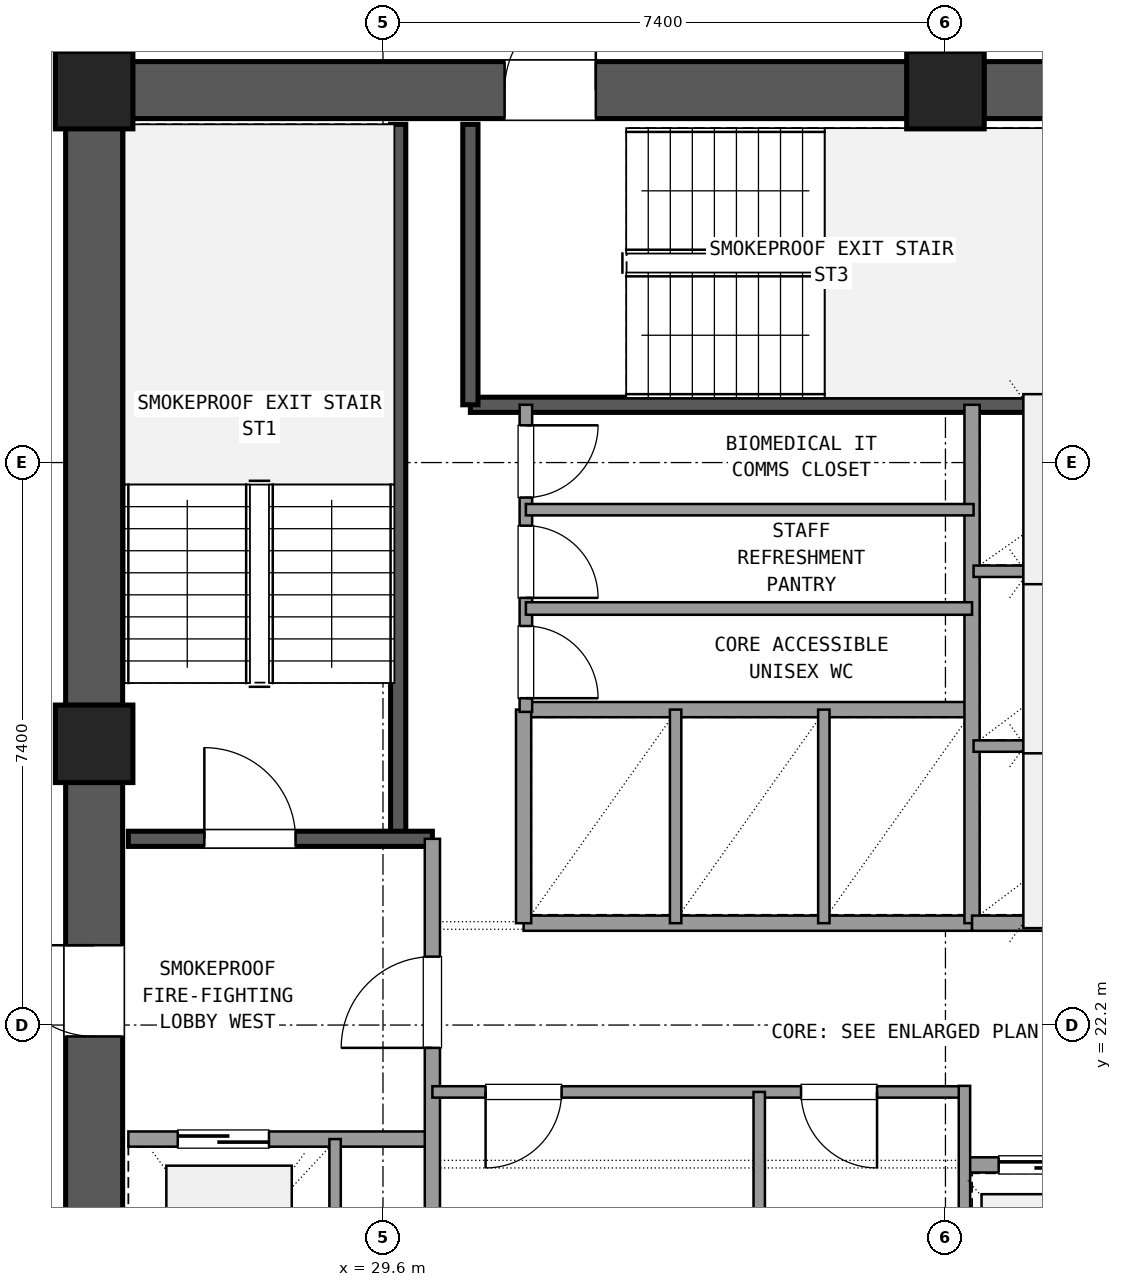
"""IFC4 building model, lengths in metres.
Left out: names, types, materials, properties, quantities, classifications, styles, units other than length and angle.
Written with IfcOpenShell. Run it as: python <this file> out.ifc"""

import sys

from ifc_helpers import new_model, si_unit, direction, frame, frame_2d, origin, origin_2d, place, context, subcontext, project, spatial, rectangle, extrude, element, fill, save


model = new_model("IFC4")
c1 = context("Model", 3, precision=1e-05, world=origin(), true_north=direction((0.0, 1.0)))
c2 = subcontext(c1, "Body", "Model", "MODEL_VIEW")
j1 = project(units=[si_unit("LENGTHUNIT", "METRE"), si_unit("PLANEANGLEUNIT", "RADIAN")], contexts=[c1])
p1 = place(None, origin())
s1 = spatial("IfcSite", under=j1, at=p1, CompositionType="ELEMENT")
p2 = place(p1, origin())
s2 = spatial("IfcBuilding", under=s1, at=p2, CompositionType="ELEMENT")
p3 = place(p2, frame((0.0, 0.0, 145.62)))
s3 = spatial("IfcBuildingStorey", under=s2, at=p3, CompositionType="ELEMENT", Elevation=145.62)
for number, where, z_axis, x_axis in (
    (1, (37.0, 34.5, 0.0), (0.0, 0.0, 1.0), (1.0, 0.0, 0.0)),
    (2, (25.8, 34.5, 0.0), (0.0, 0.0, 1.0), (1.0, 0.0, 0.0)),
    (3, (25.8, 25.9, 0.0), (0.0, 0.0, 1.0), (1.0, 0.0, 0.0)),
):
    element("IfcColumn", number, at=place(p3, frame(where, z_axis=z_axis, x_axis=x_axis)), inside=s3, PredefinedType="COLUMN", context=c2, shape_type="SweptSolid", body=[
        extrude(rectangle(XDim=1.02, YDim=1.02, at=origin_2d()), origin(), (0.0, 0.0, 1.0), 3.6),
    ])
p4 = place(p3, frame((47.695, 34.5, 0.0), z_axis=(0.0, 0.0, 1.0), x_axis=(-1.0, 0.0, 0.0)))
e4 = element("IfcWall", 4, at=p4, inside=s3, PredefinedType="SHEAR", context=c2, shape_type="SweptSolid", body=[
    extrude(rectangle(XDim=10.19, YDim=0.75, at=frame_2d((5.095, 0.0))), origin(), (0.0, 0.0, 1.0), 3.32),
])
p5 = place(p4, frame((4.595, 0.0, 0.0)))
e5 = element("IfcOpeningElement", 5, at=p5, cuts=e4, PredefinedType="OPENING", context=c2, shape_type="SweptSolid", body=[
    extrude(rectangle(XDim=1.6, YDim=2.2, at=frame_2d((0.8, 1.1))), frame((0.0, 0.385, 0.0), z_axis=(0.0, -1.0, 0.0), x_axis=(1.0, 0.0, 0.0)), (0.0, 0.0, 1.0), 0.77),
])
p6 = place(p3, frame((36.495, 34.5, 0.0), z_axis=(0.0, 0.0, 1.0), x_axis=(-1.0, 0.0, 0.0)))
e6 = element("IfcWall", 6, at=p6, inside=s3, PredefinedType="SHEAR", context=c2, shape_type="SweptSolid", body=[
    extrude(rectangle(XDim=10.19, YDim=0.75, at=frame_2d((5.095, 0.0))), origin(), (0.0, 0.0, 1.0), 3.32),
])
p7 = place(p6, frame((4.095, 0.0, 0.0)))
e7 = element("IfcOpeningElement", 7, at=p7, cuts=e6, PredefinedType="OPENING", context=c2, shape_type="SweptSolid", body=[
    extrude(rectangle(XDim=1.2, YDim=2.15, at=frame_2d((0.6, 1.075))), frame((0.0, 0.385, 0.0), z_axis=(0.0, -1.0, 0.0), x_axis=(1.0, 0.0, 0.0)), (0.0, 0.0, 1.0), 0.77),
])
p8 = place(p3, frame((25.8, 33.995, 0.0), z_axis=(0.0, 0.0, 1.0), x_axis=(0.0, -1.0, 0.0)))
e8 = element("IfcWall", 8, at=p8, inside=s3, PredefinedType="SHEAR", context=c2, shape_type="SweptSolid", body=[
    extrude(rectangle(XDim=7.59, YDim=0.75, at=frame_2d((3.795, 0.0))), origin(), (0.0, 0.0, 1.0), 3.32),
])
p9 = place(p3, frame((25.8, 25.395, 0.0), z_axis=(0.0, 0.0, 1.0), x_axis=(0.0, -1.0, 0.0)))
e9 = element("IfcWall", 9, at=p9, inside=s3, PredefinedType="SHEAR", context=c2, shape_type="SweptSolid", body=[
    extrude(rectangle(XDim=7.59, YDim=0.75, at=frame_2d((3.795, 0.0))), origin(), (0.0, 0.0, 1.0), 3.32),
])
p10 = place(p9, frame((2.145, 0.0, 0.0)))
e10 = element("IfcOpeningElement", 10, at=p10, cuts=e9, PredefinedType="OPENING", context=c2, shape_type="SweptSolid", body=[
    extrude(rectangle(XDim=1.2, YDim=2.15, at=frame_2d((0.6, 1.075))), frame((0.0, 0.385, 0.0), z_axis=(0.0, -1.0, 0.0), x_axis=(1.0, 0.0, 0.0)), (0.0, 0.0, 1.0), 0.77),
])
p11 = place(p3, frame((29.8, 24.65, 0.0), z_axis=(0.0, 0.0, 1.0), x_axis=(0.0, 1.0, 0.0)))
e11 = element("IfcWall", 11, at=p11, inside=s3, PredefinedType="SHEAR", context=c2, shape_type="SweptSolid", body=[
    extrude(rectangle(XDim=9.4, YDim=0.2, at=frame_2d((4.7, 0.0))), origin(), (0.0, 0.0, 1.0), 3.32),
])
p12 = place(p3, frame((26.25, 24.65, 0.0), z_axis=(0.0, 0.0, 1.0), x_axis=(1.0, 0.0, 0.0)))
e12 = element("IfcWall", 12, at=p12, inside=s3, PredefinedType="SHEAR", context=c2, shape_type="SweptSolid", body=[
    extrude(rectangle(XDim=4.0, YDim=0.2, at=frame_2d((2.0, 0.0))), origin(), (0.0, 0.0, 1.0), 3.32),
])
p13 = place(p12, frame((1.0, 0.0, 0.0)))
e13 = element("IfcOpeningElement", 13, at=p13, cuts=e12, PredefinedType="OPENING", context=c2, shape_type="SweptSolid", body=[
    extrude(rectangle(XDim=1.2, YDim=2.15, at=frame_2d((0.6, 1.075))), frame((0.0, 0.11, 0.0), z_axis=(0.0, -1.0, 0.0), x_axis=(1.0, 0.0, 0.0)), (0.0, 0.0, 1.0), 0.22),
])
p14 = place(p3, frame((30.75, 30.36, 0.0), z_axis=(0.0, 0.0, 1.0), x_axis=(1.0, 0.0, 0.0)))
e14 = element("IfcWall", 14, at=p14, inside=s3, PredefinedType="SHEAR", context=c2, shape_type="SweptSolid", body=[
    extrude(rectangle(XDim=9.5, YDim=0.2, at=frame_2d((4.75, 0.0))), origin(), (0.0, 0.0, 1.0), 3.32),
])
p15 = place(p3, frame((30.75, 30.36, 0.0), z_axis=(0.0, 0.0, 1.0), x_axis=(0.0, 1.0, 0.0)))
e15 = element("IfcWall", 15, at=p15, inside=s3, PredefinedType="SHEAR", context=c2, shape_type="SweptSolid", body=[
    extrude(rectangle(XDim=3.69, YDim=0.2, at=frame_2d((1.845, 0.0))), origin(), (0.0, 0.0, 1.0), 3.32),
])
p16 = place(p3, frame((26.25, 20.7, 0.0), z_axis=(0.0, 0.0, 1.0), x_axis=(1.0, 0.0, 0.0)))
e16 = element("IfcWall", 16, at=p16, inside=s3, PredefinedType="SOLIDWALL", context=c2, shape_type="SweptSolid", body=[
    extrude(rectangle(XDim=4.0, YDim=0.2, at=frame_2d((2.0, 0.0))), origin(), (0.0, 0.0, 1.0), 2.61),
])
p17 = place(p16, frame((0.65, 0.0, 0.0)))
e17 = element("IfcOpeningElement", 17, at=p17, cuts=e16, PredefinedType="OPENING", context=c2, shape_type="SweptSolid", body=[
    extrude(rectangle(XDim=1.2, YDim=2.15, at=frame_2d((0.6, 1.075))), frame((0.0, 0.11, 0.0), z_axis=(0.0, -1.0, 0.0), x_axis=(1.0, 0.0, 0.0)), (0.0, 0.0, 1.0), 0.22),
])
p18 = place(p3, frame((30.25, 17.75, 0.0), z_axis=(0.0, 0.0, 1.0), x_axis=(0.0, 1.0, 0.0)))
e18 = element("IfcWall", 18, at=p18, inside=s3, PredefinedType="SOLIDWALL", context=c2, shape_type="SweptSolid", body=[
    extrude(rectangle(XDim=6.9, YDim=0.2, at=frame_2d((3.45, 0.0))), origin(), (0.0, 0.0, 1.0), 2.61),
])
p19 = place(p18, frame((4.15, 0.0, 0.0)))
e19 = element("IfcOpeningElement", 19, at=p19, cuts=e18, PredefinedType="OPENING", context=c2, shape_type="SweptSolid", body=[
    extrude(rectangle(XDim=1.2, YDim=2.15, at=frame_2d((0.6, 1.075))), frame((0.0, 0.11, 0.0), z_axis=(0.0, -1.0, 0.0), x_axis=(1.0, 0.0, 0.0)), (0.0, 0.0, 1.0), 0.22),
])
p20 = place(p3, frame((28.97, 17.75, 0.0), z_axis=(0.0, 0.0, 1.0), x_axis=(0.0, 1.0, 0.0)))
e20 = element("IfcWall", 20, at=p20, inside=s3, PredefinedType="PARTITIONING", context=c2, shape_type="SweptSolid", body=[
    extrude(rectangle(XDim=2.95, YDim=0.15, at=frame_2d((1.475, 0.0))), origin(), (0.0, 0.0, 1.0), 2.61),
])
p21 = place(p3, frame((30.25, 21.32, 0.0), z_axis=(0.0, 0.0, 1.0), x_axis=(1.0, 0.0, 0.0)))
e21 = element("IfcWall", 21, at=p21, inside=s3, PredefinedType="PARTITIONING", context=c2, shape_type="SweptSolid", body=[
    extrude(rectangle(XDim=7.0, YDim=0.15, at=frame_2d((3.5, 0.0))), origin(), (0.0, 0.0, 1.0), 2.61),
])
p22 = place(p21, frame((0.7, 0.0, 0.0)))
e22 = element("IfcOpeningElement", 22, at=p22, cuts=e21, PredefinedType="OPENING", context=c2, shape_type="SweptSolid", body=[
    extrude(rectangle(XDim=1.0, YDim=2.15, at=frame_2d((0.5, 1.075))), frame((0.0, 0.085, 0.0), z_axis=(0.0, -1.0, 0.0), x_axis=(1.0, 0.0, 0.0)), (0.0, 0.0, 1.0), 0.17),
])
p23 = place(p21, frame((4.85, 0.0, 0.0)))
e23 = element("IfcOpeningElement", 23, at=p23, cuts=e21, PredefinedType="OPENING", context=c2, shape_type="SweptSolid", body=[
    extrude(rectangle(XDim=1.0, YDim=2.15, at=frame_2d((0.5, 1.075))), frame((0.0, 0.085, 0.0), z_axis=(0.0, -1.0, 0.0), x_axis=(1.0, 0.0, 0.0)), (0.0, 0.0, 1.0), 0.17),
])
p24 = place(p3, frame((34.55, 17.75, 0.0), z_axis=(0.0, 0.0, 1.0), x_axis=(0.0, 1.0, 0.0)))
e24 = element("IfcWall", 24, at=p24, inside=s3, PredefinedType="PARTITIONING", context=c2, shape_type="SweptSolid", body=[
    extrude(rectangle(XDim=3.57, YDim=0.15, at=frame_2d((1.785, 0.0))), origin(), (0.0, 0.0, 1.0), 2.61),
])
p25 = place(p3, frame((37.25, 20.36, 0.0), z_axis=(0.0, 0.0, 1.0), x_axis=(1.0, 0.0, 0.0)))
e25 = element("IfcWall", 25, at=p25, inside=s3, PredefinedType="SOLIDWALL", context=c2, shape_type="SweptSolid", body=[
    extrude(rectangle(XDim=6.1, YDim=0.2, at=frame_2d((3.05, 0.0))), origin(), (0.0, 0.0, 1.0), 2.61),
])
p26 = place(p25, frame((0.45, 0.0, 0.0)))
e26 = element("IfcOpeningElement", 26, at=p26, cuts=e25, PredefinedType="OPENING", context=c2, shape_type="SweptSolid", body=[
    extrude(rectangle(XDim=1.1, YDim=2.15, at=frame_2d((0.55, 1.075))), frame((0.0, 0.11, 0.0), z_axis=(0.0, -1.0, 0.0), x_axis=(1.0, 0.0, 0.0)), (0.0, 0.0, 1.0), 0.22),
])
p27 = place(p25, frame((2.5, 0.0, 0.0)))
e27 = element("IfcOpeningElement", 27, at=p27, cuts=e25, PredefinedType="OPENING", context=c2, shape_type="SweptSolid", body=[
    extrude(rectangle(XDim=1.1, YDim=2.15, at=frame_2d((0.55, 1.075))), frame((0.0, 0.11, 0.0), z_axis=(0.0, -1.0, 0.0), x_axis=(1.0, 0.0, 0.0)), (0.0, 0.0, 1.0), 0.22),
])
p28 = place(p25, frame((4.55, 0.0, 0.0)))
e28 = element("IfcOpeningElement", 28, at=p28, cuts=e25, PredefinedType="OPENING", context=c2, shape_type="SweptSolid", body=[
    extrude(rectangle(XDim=1.1, YDim=2.15, at=frame_2d((0.55, 1.075))), frame((0.0, 0.11, 0.0), z_axis=(0.0, -1.0, 0.0), x_axis=(1.0, 0.0, 0.0)), (0.0, 0.0, 1.0), 0.22),
])
p29 = place(p3, frame((37.25, 17.75, 0.0), z_axis=(0.0, 0.0, 1.0), x_axis=(0.0, 1.0, 0.0)))
e29 = element("IfcWall", 29, at=p29, inside=s3, PredefinedType="PARTITIONING", context=c2, shape_type="SweptSolid", body=[
    extrude(rectangle(XDim=3.65, YDim=0.15, at=frame_2d((1.825, 0.0))), origin(), (0.0, 0.0, 1.0), 2.61),
])
for number, where, z_axis, x_axis in (
    (30, (31.45, 23.54, 0.0), (0.0, 0.0, 1.0), (1.0, 0.0, 0.0)),
    (31, (31.45, 26.35, 0.0), (0.0, 0.0, 1.0), (1.0, 0.0, 0.0)),
):
    element("IfcWall", number, at=place(p3, frame(where, z_axis=z_axis, x_axis=x_axis)), inside=s3, PredefinedType="SOLIDWALL", context=c2, shape_type="SweptSolid", body=[
        extrude(rectangle(XDim=5.9, YDim=0.2, at=frame_2d((2.95, 0.0))), origin(), (0.0, 0.0, 1.0), 2.61),
    ])
p30 = place(p3, frame((31.45, 23.54, 0.0), z_axis=(0.0, 0.0, 1.0), x_axis=(0.0, 1.0, 0.0)))
e32 = element("IfcWall", 32, at=p30, inside=s3, PredefinedType="SOLIDWALL", context=c2, shape_type="SweptSolid", body=[
    extrude(rectangle(XDim=2.81, YDim=0.2, at=frame_2d((1.405, 0.0))), origin(), (0.0, 0.0, 1.0), 2.61),
])
for number, where, z_axis, x_axis in (
    (33, (33.45, 23.54, 0.0), (0.0, 0.0, 1.0), (0.0, 1.0, 0.0)),
    (34, (35.4, 23.54, 0.0), (0.0, 0.0, 1.0), (0.0, 1.0, 0.0)),
):
    element("IfcWall", number, at=place(p3, frame(where, z_axis=z_axis, x_axis=x_axis)), inside=s3, PredefinedType="PARTITIONING", context=c2, shape_type="SweptSolid", body=[
        extrude(rectangle(XDim=2.81, YDim=0.15, at=frame_2d((1.405, 0.0))), origin(), (0.0, 0.0, 1.0), 2.61),
    ])
p31 = place(p3, frame((37.35, 23.54, 0.0), z_axis=(0.0, 0.0, 1.0), x_axis=(0.0, 1.0, 0.0)))
e35 = element("IfcWall", 35, at=p31, inside=s3, PredefinedType="SOLIDWALL", context=c2, shape_type="SweptSolid", body=[
    extrude(rectangle(XDim=6.82, YDim=0.2, at=frame_2d((3.41, 0.0))), origin(), (0.0, 0.0, 1.0), 2.61),
])
p32 = place(p3, frame((37.35, 23.54, 0.0), z_axis=(0.0, 0.0, 1.0), x_axis=(1.0, 0.0, 0.0)))
e36 = element("IfcWall", 36, at=p32, inside=s3, PredefinedType="SOLIDWALL", context=c2, shape_type="SweptSolid", body=[
    extrude(rectangle(XDim=3.05, YDim=0.2, at=frame_2d((1.525, 0.0))), origin(), (0.0, 0.0, 1.0), 2.61),
])
for number, where, z_axis, x_axis in (
    (37, (37.37, 25.87, 0.0), (0.0, 0.0, 1.0), (1.0, 0.0, 0.0)),
    (38, (37.37, 28.17, 0.0), (0.0, 0.0, 1.0), (1.0, 0.0, 0.0)),
):
    element("IfcWall", number, at=place(p3, frame(where, z_axis=z_axis, x_axis=x_axis)), inside=s3, PredefinedType="PARTITIONING", context=c2, shape_type="SweptSolid", body=[
        extrude(rectangle(XDim=3.01, YDim=0.15, at=frame_2d((1.505, 0.0))), origin(), (0.0, 0.0, 1.0), 2.61),
    ])
p33 = place(p3, frame((31.48, 26.32, 0.0), z_axis=(0.0, 0.0, 1.0), x_axis=(0.0, 1.0, 0.0)))
e39 = element("IfcWall", 39, at=p33, inside=s3, PredefinedType="PLUMBINGWALL", context=c2, shape_type="SweptSolid", body=[
    extrude(rectangle(XDim=4.04, YDim=0.165, at=frame_2d((2.02, 0.0))), origin(), (0.0, 0.0, 1.0), 2.61),
])
p34 = place(p33, frame((0.18, 0.0, 0.0)))
e40 = element("IfcOpeningElement", 40, at=p34, cuts=e39, PredefinedType="OPENING", context=c2, shape_type="SweptSolid", body=[
    extrude(rectangle(XDim=0.95, YDim=2.1, at=frame_2d((0.475, 1.05))), frame((0.0, 0.093, 0.0), z_axis=(0.0, -1.0, 0.0), x_axis=(1.0, 0.0, 0.0)), (0.0, 0.0, 1.0), 0.185),
])
p35 = place(p33, frame((1.5, 0.0, 0.0)))
e41 = element("IfcOpeningElement", 41, at=p35, cuts=e39, PredefinedType="OPENING", context=c2, shape_type="SweptSolid", body=[
    extrude(rectangle(XDim=0.95, YDim=2.1, at=frame_2d((0.475, 1.05))), frame((0.0, 0.093, 0.0), z_axis=(0.0, -1.0, 0.0), x_axis=(1.0, 0.0, 0.0)), (0.0, 0.0, 1.0), 0.185),
])
p36 = place(p33, frame((2.82, 0.0, 0.0)))
e42 = element("IfcOpeningElement", 42, at=p36, cuts=e39, PredefinedType="OPENING", context=c2, shape_type="SweptSolid", body=[
    extrude(rectangle(XDim=0.95, YDim=2.1, at=frame_2d((0.475, 1.05))), frame((0.0, 0.093, 0.0), z_axis=(0.0, -1.0, 0.0), x_axis=(1.0, 0.0, 0.0)), (0.0, 0.0, 1.0), 0.185),
])
p37 = place(p3, frame((31.48, 27.68, 0.0), z_axis=(0.0, 0.0, 1.0), x_axis=(1.0, 0.0, 0.0)))
e43 = element("IfcWall", 43, at=p37, inside=s3, PredefinedType="PLUMBINGWALL", context=c2, shape_type="SweptSolid", body=[
    extrude(rectangle(XDim=5.87, YDim=0.165, at=frame_2d((2.935, 0.0))), origin(), (0.0, 0.0, 1.0), 2.61),
])
p38 = place(p3, frame((31.48, 28.98, 0.0), z_axis=(0.0, 0.0, 1.0), x_axis=(1.0, 0.0, 0.0)))
e44 = element("IfcWall", 44, at=p38, inside=s3, PredefinedType="PARTITIONING", context=c2, shape_type="SweptSolid", body=[
    extrude(rectangle(XDim=5.89, YDim=0.15, at=frame_2d((2.945, 0.0))), origin(), (0.0, 0.0, 1.0), 2.61),
])
p39 = place(p3, frame((37.0, 34.95, 0.0), z_axis=(0.0, 0.0, 1.0), x_axis=(0.0, 1.0, 0.0)))
e45 = element("IfcWall", 45, at=p39, inside=s3, PredefinedType="PARTITIONING", context=c2, shape_type="SweptSolid", body=[
    extrude(rectangle(XDim=3.21, YDim=0.18, at=frame_2d((1.605, 0.0))), origin(), (0.0, 0.0, 1.0), 2.61),
])
p40 = place(p39, frame((0.605, 0.0, 0.0)))
e46 = element("IfcOpeningElement", 46, at=p40, cuts=e45, PredefinedType="OPENING", context=c2, shape_type="SweptSolid", body=[
    extrude(rectangle(XDim=2.0, YDim=2.2, at=frame_2d((1.0, 1.1))), frame((0.0, 0.1, 0.0), z_axis=(0.0, -1.0, 0.0), x_axis=(1.0, 0.0, 0.0)), (0.0, 0.0, 1.0), 0.2),
])
p41 = place(p13, origin())
e47 = element("IfcDoor", 47, at=p41, inside=s3, OperationType="SINGLE_SWING_LEFT", PredefinedType="DOOR", context=c2, shape_type="SweptSolid", body=[
    extrude(rectangle(XDim=1.2, YDim=2.15, at=frame_2d((0.6, 1.075))), frame((0.0, 0.025, 0.0), z_axis=(0.0, -1.0, 0.0), x_axis=(1.0, 0.0, 0.0)), (0.0, 0.0, 1.0), 0.05),
])
fill(e13, e47)
p42 = place(p17, origin())
e48 = element("IfcDoor", 48, at=p42, inside=s3, OperationType="SLIDING_TO_LEFT", PredefinedType="DOOR", context=c2, shape_type="SweptSolid", body=[
    extrude(rectangle(XDim=1.2, YDim=2.15, at=frame_2d((0.6, 1.075))), frame((0.0, 0.025, 0.0), z_axis=(0.0, -1.0, 0.0), x_axis=(1.0, 0.0, 0.0)), (0.0, 0.0, 1.0), 0.05),
])
fill(e17, e48)
p43 = place(p19, origin())
e49 = element("IfcDoor", 49, at=p43, inside=s3, OperationType="SINGLE_SWING_LEFT", PredefinedType="DOOR", context=c2, shape_type="SweptSolid", body=[
    extrude(rectangle(XDim=1.2, YDim=2.15, at=frame_2d((0.6, 1.075))), frame((0.0, 0.025, 0.0), z_axis=(0.0, -1.0, 0.0), x_axis=(1.0, 0.0, 0.0)), (0.0, 0.0, 1.0), 0.05),
])
fill(e19, e49)
p44 = place(p10, frame((1.2, 0.0, 0.0), z_axis=(0.0, 0.0, 1.0), x_axis=(-1.0, 0.0, 0.0)))
e50 = element("IfcDoor", 50, at=p44, inside=s3, OperationType="SINGLE_SWING_LEFT", PredefinedType="DOOR", context=c2, shape_type="SweptSolid", body=[
    extrude(rectangle(XDim=1.2, YDim=2.15, at=frame_2d((0.6, 1.075))), frame((0.0, 0.025, 0.0), z_axis=(0.0, -1.0, 0.0), x_axis=(1.0, 0.0, 0.0)), (0.0, 0.0, 1.0), 0.05),
])
fill(e10, e50)
p45 = place(p7, frame((1.2, 0.0, 0.0), z_axis=(0.0, 0.0, 1.0), x_axis=(-1.0, 0.0, 0.0)))
e51 = element("IfcDoor", 51, at=p45, inside=s3, OperationType="SINGLE_SWING_LEFT", PredefinedType="DOOR", context=c2, shape_type="SweptSolid", body=[
    extrude(rectangle(XDim=1.2, YDim=2.15, at=frame_2d((0.6, 1.075))), frame((0.0, 0.025, 0.0), z_axis=(0.0, -1.0, 0.0), x_axis=(1.0, 0.0, 0.0)), (0.0, 0.0, 1.0), 0.05),
])
fill(e7, e51)
p46 = place(p22, frame((1.0, 0.0, 0.0), z_axis=(0.0, 0.0, 1.0), x_axis=(-1.0, 0.0, 0.0)))
e52 = element("IfcDoor", 52, at=p46, inside=s3, OperationType="SINGLE_SWING_LEFT", PredefinedType="DOOR", context=c2, shape_type="SweptSolid", body=[
    extrude(rectangle(XDim=1.0, YDim=2.15, at=frame_2d((0.5, 1.075))), frame((0.0, 0.025, 0.0), z_axis=(0.0, -1.0, 0.0), x_axis=(1.0, 0.0, 0.0)), (0.0, 0.0, 1.0), 0.05),
])
fill(e22, e52)
p47 = place(p23, frame((1.0, 0.0, 0.0), z_axis=(0.0, 0.0, 1.0), x_axis=(-1.0, 0.0, 0.0)))
e53 = element("IfcDoor", 53, at=p47, inside=s3, OperationType="SINGLE_SWING_RIGHT", PredefinedType="DOOR", context=c2, shape_type="SweptSolid", body=[
    extrude(rectangle(XDim=1.0, YDim=2.15, at=frame_2d((0.5, 1.075))), frame((0.0, 0.025, 0.0), z_axis=(0.0, -1.0, 0.0), x_axis=(1.0, 0.0, 0.0)), (0.0, 0.0, 1.0), 0.05),
])
fill(e23, e53)
p48 = place(p26, origin())
e54 = element("IfcDoor", 54, at=p48, inside=s3, OperationType="SLIDING_TO_LEFT", PredefinedType="DOOR", context=c2, shape_type="SweptSolid", body=[
    extrude(rectangle(XDim=1.1, YDim=2.15, at=frame_2d((0.55, 1.075))), frame((0.0, 0.025, 0.0), z_axis=(0.0, -1.0, 0.0), x_axis=(1.0, 0.0, 0.0)), (0.0, 0.0, 1.0), 0.05),
])
fill(e26, e54)
p49 = place(p34, frame((0.95, 0.0, 0.0), z_axis=(0.0, 0.0, 1.0), x_axis=(-1.0, 0.0, 0.0)))
e55 = element("IfcDoor", 55, at=p49, inside=s3, OperationType="SINGLE_SWING_LEFT", PredefinedType="DOOR", context=c2, shape_type="SweptSolid", body=[
    extrude(rectangle(XDim=0.95, YDim=2.1, at=frame_2d((0.475, 1.05))), frame((0.0, 0.025, 0.0), z_axis=(0.0, -1.0, 0.0), x_axis=(1.0, 0.0, 0.0)), (0.0, 0.0, 1.0), 0.05),
])
fill(e40, e55)
p50 = place(p35, frame((0.95, 0.0, 0.0), z_axis=(0.0, 0.0, 1.0), x_axis=(-1.0, 0.0, 0.0)))
e56 = element("IfcDoor", 56, at=p50, inside=s3, OperationType="SINGLE_SWING_LEFT", PredefinedType="DOOR", context=c2, shape_type="SweptSolid", body=[
    extrude(rectangle(XDim=0.95, YDim=2.1, at=frame_2d((0.475, 1.05))), frame((0.0, 0.025, 0.0), z_axis=(0.0, -1.0, 0.0), x_axis=(1.0, 0.0, 0.0)), (0.0, 0.0, 1.0), 0.05),
])
fill(e41, e56)
p51 = place(p36, frame((0.95, 0.0, 0.0), z_axis=(0.0, 0.0, 1.0), x_axis=(-1.0, 0.0, 0.0)))
e57 = element("IfcDoor", 57, at=p51, inside=s3, OperationType="SINGLE_SWING_RIGHT", PredefinedType="DOOR", context=c2, shape_type="SweptSolid", body=[
    extrude(rectangle(XDim=0.95, YDim=2.1, at=frame_2d((0.475, 1.05))), frame((0.0, 0.025, 0.0), z_axis=(0.0, -1.0, 0.0), x_axis=(1.0, 0.0, 0.0)), (0.0, 0.0, 1.0), 0.05),
])
fill(e42, e57)
save(model, sys.argv[1])
